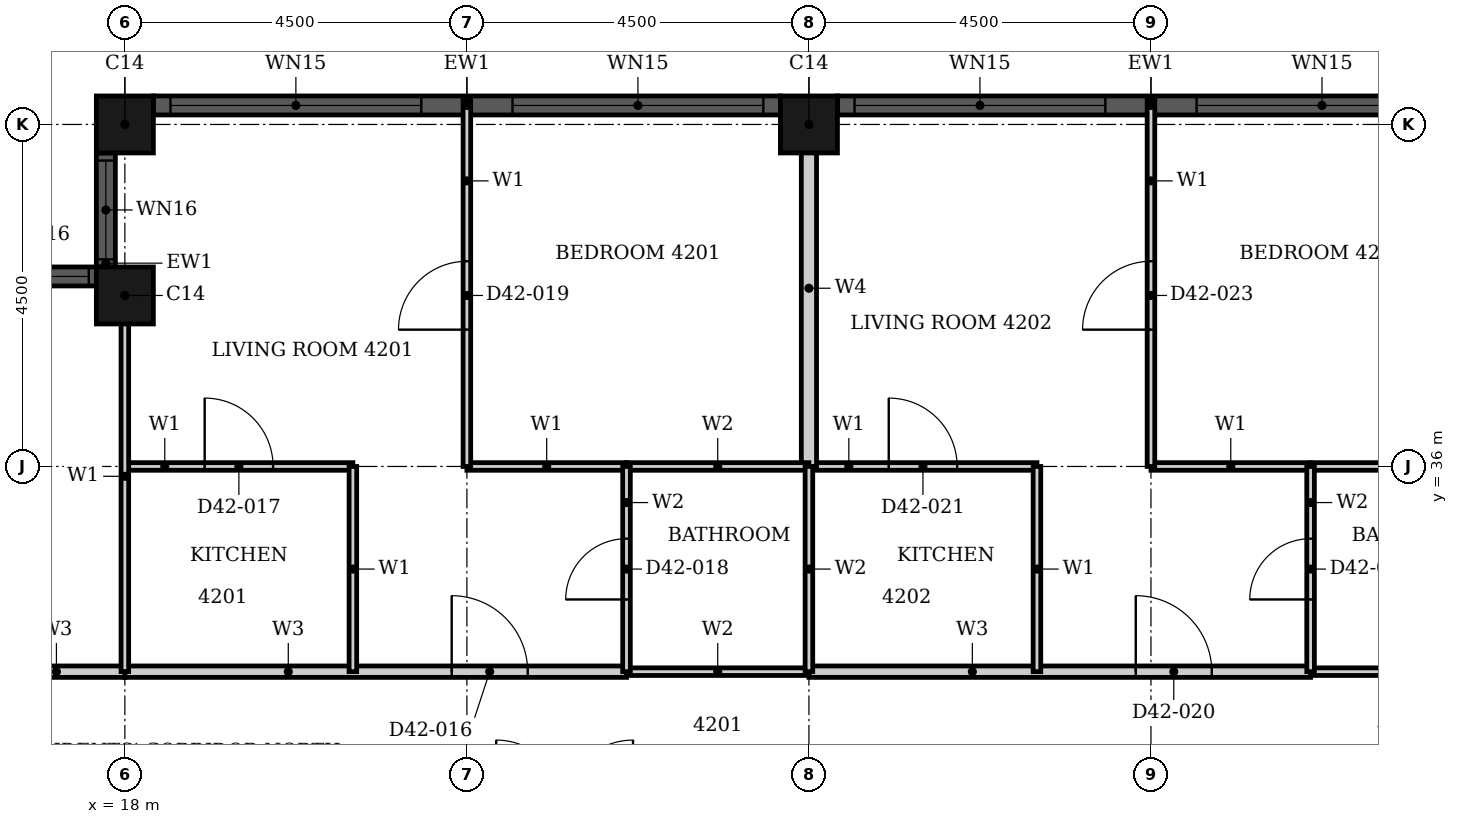
"""IFC4 building model, lengths in metres.
Left out: names, types, materials, properties, quantities, classifications, styles, units other than length and angle.
Written with IfcOpenShell. Run it as: python <this file> out.ifc"""

import sys

from ifc_helpers import new_model, si_unit, direction, frame, frame_2d, origin, origin_2d, place, context, subcontext, project, spatial, rectangle, hollow_rectangle, extrude, element, fill, save


model = new_model("IFC4")
c1 = context("Model", 3, precision=1e-05, world=origin(), true_north=direction((0.0, 1.0)))
c2 = subcontext(c1, "Body", "Model", "MODEL_VIEW")
j1 = project(units=[si_unit("LENGTHUNIT", "METRE"), si_unit("PLANEANGLEUNIT", "RADIAN")], contexts=[c1])
p1 = place(None, origin())
s1 = spatial("IfcSite", under=j1, at=p1, CompositionType="ELEMENT")
p2 = place(p1, origin())
s2 = spatial("IfcBuilding", under=s1, at=p2, CompositionType="ELEMENT")
p3 = place(p2, frame((0.0, 0.0, 169.1)))
s3 = spatial("IfcBuildingStorey", under=s2, at=p3, CompositionType="ELEMENT", Elevation=169.1)
for number, where, z_axis, x_axis in (
    (1, (27.0, 40.5, 0.0), (0.0, 0.0, 1.0), (1.0, 0.0, 0.0)),
    (2, (18.0, 40.5, 0.0), (0.0, 0.0, 1.0), (1.0, 0.0, 0.0)),
    (3, (18.0, 38.25, 0.0), (0.0, 0.0, 1.0), (1.0, 0.0, 0.0)),
):
    element("IfcColumn", number, at=place(p3, frame(where, z_axis=z_axis, x_axis=x_axis)), inside=s3, PredefinedType="COLUMN", context=c2, shape_type="SweptSolid", body=[
        extrude(hollow_rectangle(XDim=0.75, YDim=0.75, WallThickness=0.024, at=origin_2d()), origin(), (0.0, 0.0, 1.0), 3.7),
    ])
p4 = place(p3, frame((35.625, 40.75, 0.0), z_axis=(0.0, 0.0, 1.0), x_axis=(-1.0, 0.0, 0.0)))
e4 = element("IfcWall", 4, at=p4, inside=s3, PredefinedType="SOLIDWALL", context=c2, shape_type="SweptSolid", body=[
    extrude(rectangle(XDim=8.25, YDim=0.25, at=frame_2d((4.125, 0.0))), origin(), (0.0, 0.0, 1.0), 3.7),
])
p5 = place(p4, frame((0.225, 0.0, 0.45)))
e5 = element("IfcOpeningElement", 5, at=p5, cuts=e4, PredefinedType="OPENING", context=c2, shape_type="SweptSolid", body=[
    extrude(rectangle(XDim=3.3, YDim=2.3, at=frame_2d((1.65, 1.15))), frame((0.0, 0.135, 0.0), z_axis=(0.0, -1.0, 0.0), x_axis=(1.0, 0.0, 0.0)), (0.0, 0.0, 1.0), 0.27),
])
p6 = place(p4, frame((4.725, 0.0, 0.45)))
e6 = element("IfcOpeningElement", 6, at=p6, cuts=e4, PredefinedType="OPENING", context=c2, shape_type="SweptSolid", body=[
    extrude(rectangle(XDim=3.3, YDim=2.3, at=frame_2d((1.65, 1.15))), frame((0.0, 0.135, 0.0), z_axis=(0.0, -1.0, 0.0), x_axis=(1.0, 0.0, 0.0)), (0.0, 0.0, 1.0), 0.27),
])
p7 = place(p3, frame((26.625, 40.75, 0.0), z_axis=(0.0, 0.0, 1.0), x_axis=(-1.0, 0.0, 0.0)))
e7 = element("IfcWall", 7, at=p7, inside=s3, PredefinedType="SOLIDWALL", context=c2, shape_type="SweptSolid", body=[
    extrude(rectangle(XDim=8.25, YDim=0.25, at=frame_2d((4.125, 0.0))), origin(), (0.0, 0.0, 1.0), 3.7),
])
p8 = place(p7, frame((0.225, 0.0, 0.45)))
e8 = element("IfcOpeningElement", 8, at=p8, cuts=e7, PredefinedType="OPENING", context=c2, shape_type="SweptSolid", body=[
    extrude(rectangle(XDim=3.3, YDim=2.3, at=frame_2d((1.65, 1.15))), frame((0.0, 0.135, 0.0), z_axis=(0.0, -1.0, 0.0), x_axis=(1.0, 0.0, 0.0)), (0.0, 0.0, 1.0), 0.27),
])
p9 = place(p7, frame((4.725, 0.0, 0.45)))
e9 = element("IfcOpeningElement", 9, at=p9, cuts=e7, PredefinedType="OPENING", context=c2, shape_type="SweptSolid", body=[
    extrude(rectangle(XDim=3.3, YDim=2.3, at=frame_2d((1.65, 1.15))), frame((0.0, 0.135, 0.0), z_axis=(0.0, -1.0, 0.0), x_axis=(1.0, 0.0, 0.0)), (0.0, 0.0, 1.0), 0.27),
])
p10 = place(p3, frame((17.75, 40.125, 0.0), z_axis=(0.0, 0.0, 1.0), x_axis=(0.0, -1.0, 0.0)))
e10 = element("IfcWall", 10, at=p10, inside=s3, PredefinedType="SOLIDWALL", context=c2, shape_type="SweptSolid", body=[
    extrude(rectangle(XDim=1.5, YDim=0.25, at=frame_2d((0.75, 0.0))), origin(), (0.0, 0.0, 1.0), 3.7),
])
p11 = place(p10, frame((0.1, 0.0, 0.9)))
e11 = element("IfcOpeningElement", 11, at=p11, cuts=e10, PredefinedType="OPENING", context=c2, shape_type="SweptSolid", body=[
    extrude(rectangle(XDim=1.3, YDim=1.85, at=frame_2d((0.65, 0.925))), frame((0.0, 0.135, 0.0), z_axis=(0.0, -1.0, 0.0), x_axis=(1.0, 0.0, 0.0)), (0.0, 0.0, 1.0), 0.27),
])
p12 = place(p3, frame((17.625, 38.5, 0.0), z_axis=(0.0, 0.0, 1.0), x_axis=(-1.0, 0.0, 0.0)))
e12 = element("IfcWall", 12, at=p12, inside=s3, PredefinedType="SOLIDWALL", context=c2, shape_type="SweptSolid", body=[
    extrude(rectangle(XDim=1.5, YDim=0.25, at=frame_2d((0.75, 0.0))), origin(), (0.0, 0.0, 1.0), 3.7),
])
p13 = place(p12, frame((0.1, 0.0, 0.9)))
e13 = element("IfcOpeningElement", 13, at=p13, cuts=e12, PredefinedType="OPENING", context=c2, shape_type="SweptSolid", body=[
    extrude(rectangle(XDim=1.3, YDim=1.85, at=frame_2d((0.65, 0.925))), frame((0.0, 0.135, 0.0), z_axis=(0.0, -1.0, 0.0), x_axis=(1.0, 0.0, 0.0)), (0.0, 0.0, 1.0), 0.27),
])
p14 = place(p3, frame((18.0, 33.3, 0.0), z_axis=(0.0, 0.0, 1.0), x_axis=(1.0, 0.0, 0.0)))
e14 = element("IfcWall", 14, at=p14, inside=s3, PredefinedType="PARTITIONING", context=c2, shape_type="SweptSolid", body=[
    extrude(rectangle(XDim=6.6, YDim=0.15, at=frame_2d((3.3, 0.0))), origin(), (0.0, 0.0, 1.0), 3.4),
])
p15 = place(p14, frame((4.3, 0.0, 0.0)))
e15 = element("IfcOpeningElement", 15, at=p15, cuts=e14, PredefinedType="OPENING", context=c2, shape_type="SweptSolid", body=[
    extrude(rectangle(XDim=1.0, YDim=2.2, at=frame_2d((0.5, 1.1))), frame((0.0, 0.085, 0.0), z_axis=(0.0, -1.0, 0.0), x_axis=(1.0, 0.0, 0.0)), (0.0, 0.0, 1.0), 0.17),
])
p16 = place(p3, frame((27.0, 33.3, 0.0), z_axis=(0.0, 0.0, 1.0), x_axis=(1.0, 0.0, 0.0)))
e16 = element("IfcWall", 16, at=p16, inside=s3, PredefinedType="PARTITIONING", context=c2, shape_type="SweptSolid", body=[
    extrude(rectangle(XDim=6.6, YDim=0.15, at=frame_2d((3.3, 0.0))), origin(), (0.0, 0.0, 1.0), 3.4),
])
p17 = place(p16, frame((4.3, 0.0, 0.0)))
e17 = element("IfcOpeningElement", 17, at=p17, cuts=e16, PredefinedType="OPENING", context=c2, shape_type="SweptSolid", body=[
    extrude(rectangle(XDim=1.0, YDim=2.2, at=frame_2d((0.5, 1.1))), frame((0.0, 0.085, 0.0), z_axis=(0.0, -1.0, 0.0), x_axis=(1.0, 0.0, 0.0)), (0.0, 0.0, 1.0), 0.17),
])
p18 = place(p3, frame((16.2, 33.3, 0.0), z_axis=(0.0, 0.0, 1.0), x_axis=(1.0, 0.0, 0.0)))
e18 = element("IfcWall", 18, at=p18, inside=s3, PredefinedType="PARTITIONING", context=c2, shape_type="SweptSolid", body=[
    extrude(rectangle(XDim=1.799, YDim=0.15, at=frame_2d((0.899, 0.0))), origin(), (0.0, 0.0, 1.0), 3.4),
])
p19 = place(p3, frame((22.5, 36.0, 0.0), z_axis=(0.0, 0.0, 1.0), x_axis=(1.0, 0.0, 0.0)))
e19 = element("IfcWall", 19, at=p19, inside=s3, PredefinedType="PARTITIONING", context=c2, shape_type="SweptSolid", body=[
    extrude(rectangle(XDim=2.1, YDim=0.1, at=frame_2d((1.05, 0.0))), origin(), (0.0, 0.0, 1.0), 3.4),
])
p20 = place(p3, frame((18.0, 36.0, 0.0), z_axis=(0.0, 0.0, 1.0), x_axis=(1.0, 0.0, 0.0)))
e20 = element("IfcWall", 20, at=p20, inside=s3, PredefinedType="PARTITIONING", context=c2, shape_type="SweptSolid", body=[
    extrude(rectangle(XDim=3.0, YDim=0.1, at=frame_2d((1.5, 0.0))), origin(), (0.0, 0.0, 1.0), 3.4),
])
p21 = place(p20, frame((1.05, 0.0, 0.0)))
e21 = element("IfcOpeningElement", 21, at=p21, cuts=e20, PredefinedType="OPENING", context=c2, shape_type="SweptSolid", body=[
    extrude(rectangle(XDim=0.9, YDim=2.1, at=frame_2d((0.45, 1.05))), frame((0.0, 0.06, 0.0), z_axis=(0.0, -1.0, 0.0), x_axis=(1.0, 0.0, 0.0)), (0.0, 0.0, 1.0), 0.12),
])
p22 = place(p3, frame((31.5, 36.0, 0.0), z_axis=(0.0, 0.0, 1.0), x_axis=(1.0, 0.0, 0.0)))
e22 = element("IfcWall", 22, at=p22, inside=s3, PredefinedType="PARTITIONING", context=c2, shape_type="SweptSolid", body=[
    extrude(rectangle(XDim=2.1, YDim=0.1, at=frame_2d((1.05, 0.0))), origin(), (0.0, 0.0, 1.0), 3.4),
])
p23 = place(p3, frame((27.0, 36.0, 0.0), z_axis=(0.0, 0.0, 1.0), x_axis=(1.0, 0.0, 0.0)))
e23 = element("IfcWall", 23, at=p23, inside=s3, PredefinedType="PARTITIONING", context=c2, shape_type="SweptSolid", body=[
    extrude(rectangle(XDim=3.0, YDim=0.1, at=frame_2d((1.5, 0.0))), origin(), (0.0, 0.0, 1.0), 3.4),
])
p24 = place(p23, frame((1.05, 0.0, 0.0)))
e24 = element("IfcOpeningElement", 24, at=p24, cuts=e23, PredefinedType="OPENING", context=c2, shape_type="SweptSolid", body=[
    extrude(rectangle(XDim=0.9, YDim=2.1, at=frame_2d((0.45, 1.05))), frame((0.0, 0.06, 0.0), z_axis=(0.0, -1.0, 0.0), x_axis=(1.0, 0.0, 0.0)), (0.0, 0.0, 1.0), 0.12),
])
p25 = place(p3, frame((18.0, 33.301, 0.0), z_axis=(0.0, 0.0, 1.0), x_axis=(0.0, 1.0, 0.0)))
e25 = element("IfcWall", 25, at=p25, inside=s3, PredefinedType="PARTITIONING", context=c2, shape_type="SweptSolid", body=[
    extrude(rectangle(XDim=5.139, YDim=0.1, at=frame_2d((2.569, 0.0))), origin(), (0.0, 0.0, 1.0), 3.4),
])
p26 = place(p3, frame((21.0, 33.3, 0.0), z_axis=(0.0, 0.0, 1.0), x_axis=(0.0, 1.0, 0.0)))
e26 = element("IfcWall", 26, at=p26, inside=s3, PredefinedType="PARTITIONING", context=c2, shape_type="SweptSolid", body=[
    extrude(rectangle(XDim=2.7, YDim=0.1, at=frame_2d((1.35, 0.0))), origin(), (0.0, 0.0, 1.0), 3.4),
])
p27 = place(p3, frame((22.5, 36.0, 0.0), z_axis=(0.0, 0.0, 1.0), x_axis=(0.0, 1.0, 0.0)))
e27 = element("IfcWall", 27, at=p27, inside=s3, PredefinedType="PARTITIONING", context=c2, shape_type="SweptSolid", body=[
    extrude(rectangle(XDim=4.815, YDim=0.1, at=frame_2d((2.407, 0.0))), origin(), (0.0, 0.0, 1.0), 3.4),
])
p28 = place(p27, frame((1.8, 0.0, 0.0)))
e28 = element("IfcOpeningElement", 28, at=p28, cuts=e27, PredefinedType="OPENING", context=c2, shape_type="SweptSolid", body=[
    extrude(rectangle(XDim=0.9, YDim=2.1, at=frame_2d((0.45, 1.05))), frame((0.0, 0.06, 0.0), z_axis=(0.0, -1.0, 0.0), x_axis=(1.0, 0.0, 0.0)), (0.0, 0.0, 1.0), 0.12),
])
p29 = place(p3, frame((30.0, 33.3, 0.0), z_axis=(0.0, 0.0, 1.0), x_axis=(0.0, 1.0, 0.0)))
e29 = element("IfcWall", 29, at=p29, inside=s3, PredefinedType="PARTITIONING", context=c2, shape_type="SweptSolid", body=[
    extrude(rectangle(XDim=2.7, YDim=0.1, at=frame_2d((1.35, 0.0))), origin(), (0.0, 0.0, 1.0), 3.4),
])
p30 = place(p3, frame((31.5, 36.0, 0.0), z_axis=(0.0, 0.0, 1.0), x_axis=(0.0, 1.0, 0.0)))
e30 = element("IfcWall", 30, at=p30, inside=s3, PredefinedType="PARTITIONING", context=c2, shape_type="SweptSolid", body=[
    extrude(rectangle(XDim=4.815, YDim=0.1, at=frame_2d((2.407, 0.0))), origin(), (0.0, 0.0, 1.0), 3.4),
])
p31 = place(p30, frame((1.8, 0.0, 0.0)))
e31 = element("IfcOpeningElement", 31, at=p31, cuts=e30, PredefinedType="OPENING", context=c2, shape_type="SweptSolid", body=[
    extrude(rectangle(XDim=0.9, YDim=2.1, at=frame_2d((0.45, 1.05))), frame((0.0, 0.06, 0.0), z_axis=(0.0, -1.0, 0.0), x_axis=(1.0, 0.0, 0.0)), (0.0, 0.0, 1.0), 0.12),
])
p32 = place(p3, frame((27.0, 36.0, 0.0), z_axis=(0.0, 0.0, 1.0), x_axis=(0.0, 1.0, 0.0)))
e32 = element("IfcWall", 32, at=p32, inside=s3, PredefinedType="PARTITIONING", context=c2, shape_type="SweptSolid", body=[
    extrude(rectangle(XDim=4.69, YDim=0.2, at=frame_2d((2.345, 0.0))), origin(), (0.0, 0.0, 1.0), 3.4),
])
for number, where, z_axis, x_axis in (
    (33, (24.6, 33.3, 0.0), (0.0, 0.0, 1.0), (1.0, 0.0, 0.0)),
    (34, (33.6, 33.3, 0.0), (0.0, 0.0, 1.0), (1.0, 0.0, 0.0)),
    (35, (24.6, 36.0, 0.0), (0.0, 0.0, 1.0), (1.0, 0.0, 0.0)),
    (36, (33.6, 36.0, 0.0), (0.0, 0.0, 1.0), (1.0, 0.0, 0.0)),
):
    element("IfcWall", number, at=place(p3, frame(where, z_axis=z_axis, x_axis=x_axis)), inside=s3, PredefinedType="PARTITIONING", context=c2, shape_type="SweptSolid", body=[
        extrude(rectangle(XDim=2.4, YDim=0.1, at=frame_2d((1.2, 0.0))), origin(), (0.0, 0.0, 1.0), 3.4),
    ])
p33 = place(p3, frame((24.6, 33.3, 0.0), z_axis=(0.0, 0.0, 1.0), x_axis=(0.0, 1.0, 0.0)))
e37 = element("IfcWall", 37, at=p33, inside=s3, PredefinedType="PARTITIONING", context=c2, shape_type="SweptSolid", body=[
    extrude(rectangle(XDim=2.7, YDim=0.1, at=frame_2d((1.35, 0.0))), origin(), (0.0, 0.0, 1.0), 3.4),
])
p34 = place(p33, frame((0.95, 0.0, 0.0)))
e38 = element("IfcOpeningElement", 38, at=p34, cuts=e37, PredefinedType="OPENING", context=c2, shape_type="SweptSolid", body=[
    extrude(rectangle(XDim=0.8, YDim=2.1, at=frame_2d((0.4, 1.05))), frame((0.0, 0.06, 0.0), z_axis=(0.0, -1.0, 0.0), x_axis=(1.0, 0.0, 0.0)), (0.0, 0.0, 1.0), 0.12),
])
p35 = place(p3, frame((27.0, 33.3, 0.0), z_axis=(0.0, 0.0, 1.0), x_axis=(0.0, 1.0, 0.0)))
e39 = element("IfcWall", 39, at=p35, inside=s3, PredefinedType="PARTITIONING", context=c2, shape_type="SweptSolid", body=[
    extrude(rectangle(XDim=2.7, YDim=0.1, at=frame_2d((1.35, 0.0))), origin(), (0.0, 0.0, 1.0), 3.4),
])
p36 = place(p3, frame((33.6, 33.3, 0.0), z_axis=(0.0, 0.0, 1.0), x_axis=(0.0, 1.0, 0.0)))
e40 = element("IfcWall", 40, at=p36, inside=s3, PredefinedType="PARTITIONING", context=c2, shape_type="SweptSolid", body=[
    extrude(rectangle(XDim=2.7, YDim=0.1, at=frame_2d((1.35, 0.0))), origin(), (0.0, 0.0, 1.0), 3.4),
])
p37 = place(p36, frame((0.95, 0.0, 0.0)))
e41 = element("IfcOpeningElement", 41, at=p37, cuts=e40, PredefinedType="OPENING", context=c2, shape_type="SweptSolid", body=[
    extrude(rectangle(XDim=0.8, YDim=2.1, at=frame_2d((0.4, 1.05))), frame((0.0, 0.06, 0.0), z_axis=(0.0, -1.0, 0.0), x_axis=(1.0, 0.0, 0.0)), (0.0, 0.0, 1.0), 0.12),
])
p38 = place(p5, origin())
e42 = element("IfcWindow", 42, at=p38, inside=s3, PartitioningType="SINGLE_PANEL", PredefinedType="WINDOW", context=c2, shape_type="SweptSolid", body=[
    extrude(rectangle(XDim=3.3, YDim=2.3, at=frame_2d((1.65, 1.15))), frame((0.0, 0.03, 0.0), z_axis=(0.0, -1.0, 0.0), x_axis=(1.0, 0.0, 0.0)), (0.0, 0.0, 1.0), 0.06),
])
fill(e5, e42)
p39 = place(p6, origin())
e43 = element("IfcWindow", 43, at=p39, inside=s3, PartitioningType="SINGLE_PANEL", PredefinedType="WINDOW", context=c2, shape_type="SweptSolid", body=[
    extrude(rectangle(XDim=3.3, YDim=2.3, at=frame_2d((1.65, 1.15))), frame((0.0, 0.03, 0.0), z_axis=(0.0, -1.0, 0.0), x_axis=(1.0, 0.0, 0.0)), (0.0, 0.0, 1.0), 0.06),
])
fill(e6, e43)
p40 = place(p8, origin())
e44 = element("IfcWindow", 44, at=p40, inside=s3, PartitioningType="SINGLE_PANEL", PredefinedType="WINDOW", context=c2, shape_type="SweptSolid", body=[
    extrude(rectangle(XDim=3.3, YDim=2.3, at=frame_2d((1.65, 1.15))), frame((0.0, 0.03, 0.0), z_axis=(0.0, -1.0, 0.0), x_axis=(1.0, 0.0, 0.0)), (0.0, 0.0, 1.0), 0.06),
])
fill(e8, e44)
p41 = place(p9, origin())
e45 = element("IfcWindow", 45, at=p41, inside=s3, PartitioningType="SINGLE_PANEL", PredefinedType="WINDOW", context=c2, shape_type="SweptSolid", body=[
    extrude(rectangle(XDim=3.3, YDim=2.3, at=frame_2d((1.65, 1.15))), frame((0.0, 0.03, 0.0), z_axis=(0.0, -1.0, 0.0), x_axis=(1.0, 0.0, 0.0)), (0.0, 0.0, 1.0), 0.06),
])
fill(e9, e45)
p42 = place(p11, origin())
e46 = element("IfcWindow", 46, at=p42, inside=s3, PartitioningType="SINGLE_PANEL", PredefinedType="WINDOW", context=c2, shape_type="SweptSolid", body=[
    extrude(rectangle(XDim=1.3, YDim=1.85, at=frame_2d((0.65, 0.925))), frame((0.0, 0.03, 0.0), z_axis=(0.0, -1.0, 0.0), x_axis=(1.0, 0.0, 0.0)), (0.0, 0.0, 1.0), 0.06),
])
fill(e11, e46)
p43 = place(p13, origin())
e47 = element("IfcWindow", 47, at=p43, inside=s3, PartitioningType="SINGLE_PANEL", PredefinedType="WINDOW", context=c2, shape_type="SweptSolid", body=[
    extrude(rectangle(XDim=1.3, YDim=1.85, at=frame_2d((0.65, 0.925))), frame((0.0, 0.03, 0.0), z_axis=(0.0, -1.0, 0.0), x_axis=(1.0, 0.0, 0.0)), (0.0, 0.0, 1.0), 0.06),
])
fill(e13, e47)
p44 = place(p15, origin())
e48 = element("IfcDoor", 48, at=p44, inside=s3, OperationType="SINGLE_SWING_LEFT", PredefinedType="DOOR", context=c2, shape_type="SweptSolid", body=[
    extrude(rectangle(XDim=1.0, YDim=2.2, at=frame_2d((0.5, 1.1))), frame((0.0, 0.025, 0.0), z_axis=(0.0, -1.0, 0.0), x_axis=(1.0, 0.0, 0.0)), (0.0, 0.0, 1.0), 0.05),
])
fill(e15, e48)
p45 = place(p21, origin())
e49 = element("IfcDoor", 49, at=p45, inside=s3, OperationType="SINGLE_SWING_RIGHT", PredefinedType="DOOR", context=c2, shape_type="SweptSolid", body=[
    extrude(rectangle(XDim=0.9, YDim=2.1, at=frame_2d((0.45, 1.05))), frame((0.0, 0.025, 0.0), z_axis=(0.0, -1.0, 0.0), x_axis=(1.0, 0.0, 0.0)), (0.0, 0.0, 1.0), 0.05),
])
fill(e21, e49)
p46 = place(p34, origin())
e50 = element("IfcDoor", 50, at=p46, inside=s3, OperationType="SINGLE_SWING_RIGHT", PredefinedType="DOOR", context=c2, shape_type="SweptSolid", body=[
    extrude(rectangle(XDim=0.8, YDim=2.1, at=frame_2d((0.4, 1.05))), frame((0.0, 0.025, 0.0), z_axis=(0.0, -1.0, 0.0), x_axis=(1.0, 0.0, 0.0)), (0.0, 0.0, 1.0), 0.05),
])
fill(e38, e50)
p47 = place(p28, origin())
e51 = element("IfcDoor", 51, at=p47, inside=s3, OperationType="SINGLE_SWING_RIGHT", PredefinedType="DOOR", context=c2, shape_type="SweptSolid", body=[
    extrude(rectangle(XDim=0.9, YDim=2.1, at=frame_2d((0.45, 1.05))), frame((0.0, 0.025, 0.0), z_axis=(0.0, -1.0, 0.0), x_axis=(1.0, 0.0, 0.0)), (0.0, 0.0, 1.0), 0.05),
])
fill(e28, e51)
p48 = place(p17, origin())
e52 = element("IfcDoor", 52, at=p48, inside=s3, OperationType="SINGLE_SWING_RIGHT", PredefinedType="DOOR", context=c2, shape_type="SweptSolid", body=[
    extrude(rectangle(XDim=1.0, YDim=2.2, at=frame_2d((0.5, 1.1))), frame((0.0, 0.025, 0.0), z_axis=(0.0, -1.0, 0.0), x_axis=(1.0, 0.0, 0.0)), (0.0, 0.0, 1.0), 0.05),
])
fill(e17, e52)
p49 = place(p24, origin())
e53 = element("IfcDoor", 53, at=p49, inside=s3, OperationType="SINGLE_SWING_RIGHT", PredefinedType="DOOR", context=c2, shape_type="SweptSolid", body=[
    extrude(rectangle(XDim=0.9, YDim=2.1, at=frame_2d((0.45, 1.05))), frame((0.0, 0.025, 0.0), z_axis=(0.0, -1.0, 0.0), x_axis=(1.0, 0.0, 0.0)), (0.0, 0.0, 1.0), 0.05),
])
fill(e24, e53)
p50 = place(p37, origin())
e54 = element("IfcDoor", 54, at=p50, inside=s3, OperationType="SINGLE_SWING_RIGHT", PredefinedType="DOOR", context=c2, shape_type="SweptSolid", body=[
    extrude(rectangle(XDim=0.8, YDim=2.1, at=frame_2d((0.4, 1.05))), frame((0.0, 0.025, 0.0), z_axis=(0.0, -1.0, 0.0), x_axis=(1.0, 0.0, 0.0)), (0.0, 0.0, 1.0), 0.05),
])
fill(e41, e54)
p51 = place(p31, origin())
e55 = element("IfcDoor", 55, at=p51, inside=s3, OperationType="SINGLE_SWING_RIGHT", PredefinedType="DOOR", context=c2, shape_type="SweptSolid", body=[
    extrude(rectangle(XDim=0.9, YDim=2.1, at=frame_2d((0.45, 1.05))), frame((0.0, 0.025, 0.0), z_axis=(0.0, -1.0, 0.0), x_axis=(1.0, 0.0, 0.0)), (0.0, 0.0, 1.0), 0.05),
])
fill(e31, e55)
save(model, sys.argv[1])
